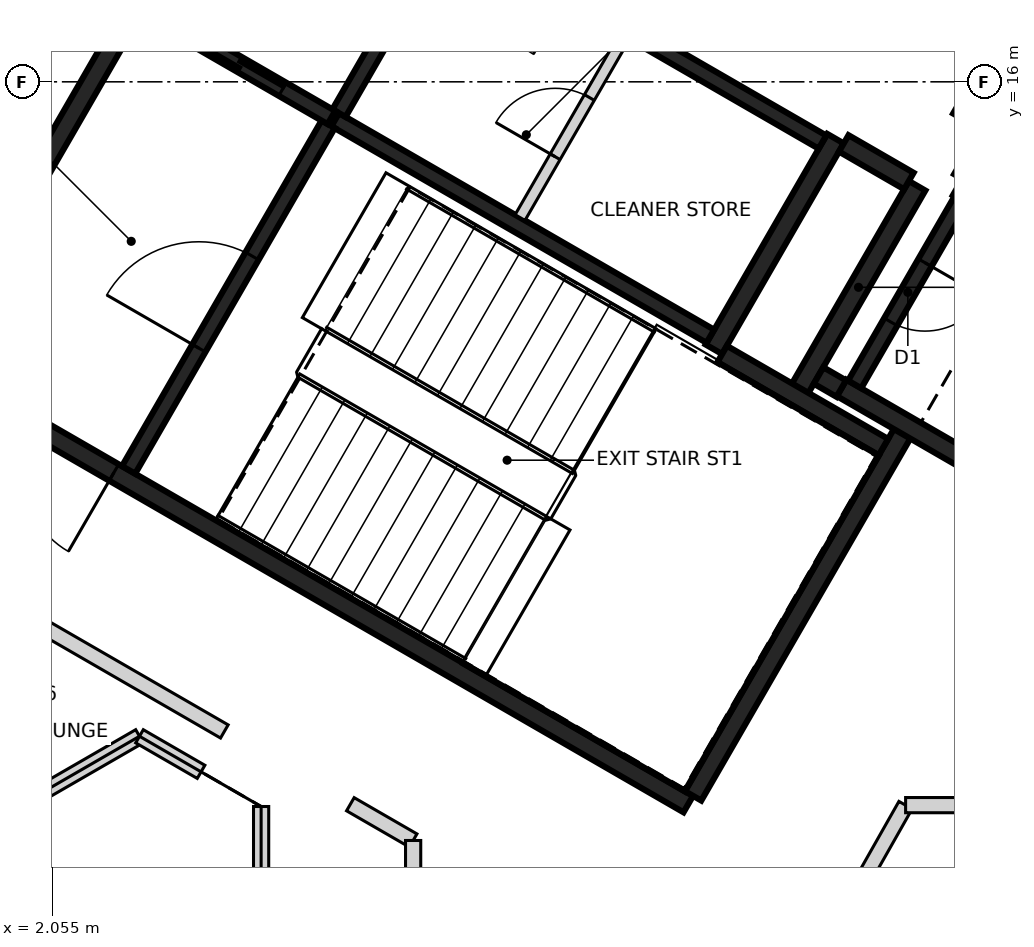
"""IFC4 building model, lengths in metres.
Left out: names, types, materials, properties, quantities, classifications, styles, units other than length and angle.
Written with IfcOpenShell. Run it as: python <this file> out.ifc"""

import sys

from ifc_helpers import new_model, si_unit, direction, frame, frame_2d, origin, place, context, subcontext, project, spatial, rectangle, extrude, element, fill, save


model = new_model("IFC4")
c1 = context("Model", 3, precision=1e-05, world=origin(), true_north=direction((0.0, 1.0)))
c2 = subcontext(c1, "Body", "Model", "MODEL_VIEW")
j1 = project(units=[si_unit("LENGTHUNIT", "METRE"), si_unit("PLANEANGLEUNIT", "RADIAN")], contexts=[c1])
p1 = place(None, origin())
s1 = spatial("IfcSite", under=j1, at=p1, CompositionType="ELEMENT")
p2 = place(p1, origin())
s2 = spatial("IfcBuilding", under=s1, at=p2, CompositionType="ELEMENT")
p3 = place(p2, frame((0.0, 0.0, 132.4)))
s3 = spatial("IfcBuildingStorey", under=s2, at=p3, CompositionType="ELEMENT", Elevation=132.4)
p4 = place(p3, frame((10.42, 6.498, 0.0), z_axis=(0.0, 0.0, 1.0), x_axis=(-0.866021906294, 0.500006057782, 0.0)))
e1 = element("IfcWall", 1, at=p4, inside=s3, PredefinedType="SHEAR", context=c2, shape_type="SweptSolid", body=[
    extrude(rectangle(XDim=11.55, YDim=0.25, at=frame_2d((5.775, 0.0))), origin(), (0.0, 0.0, 1.0), 3.2),
])
p5 = place(p4, frame((10.025, 0.0, 0.0)))
e2 = element("IfcOpeningElement", 2, at=p5, cuts=e1, PredefinedType="OPENING", context=c2, shape_type="SweptSolid", body=[
    extrude(rectangle(XDim=1.2, YDim=2.1, at=frame_2d((0.6, 1.05))), frame((0.0, 0.135, 0.0), z_axis=(0.0, -1.0, 0.0), x_axis=(1.0, 0.0, 0.0)), (0.0, 0.0, 1.0), 0.27),
])
p6 = place(p4, frame((8.725, 0.0, 0.0)))
e3 = element("IfcOpeningElement", 3, at=p6, cuts=e1, PredefinedType="OPENING", context=c2, shape_type="SweptSolid", body=[
    extrude(rectangle(XDim=1.2, YDim=2.1, at=frame_2d((0.6, 1.05))), frame((0.0, 0.135, 0.0), z_axis=(0.0, -1.0, 0.0), x_axis=(1.0, 0.0, 0.0)), (0.0, 0.0, 1.0), 0.27),
])
p7 = place(p3, frame((0.48, 12.381, 0.0), z_axis=(0.0, 0.0, 1.0), x_axis=(0.49999885962, 0.866026062182, 0.0)))
e4 = element("IfcWall", 4, at=p7, inside=s3, PredefinedType="SHEAR", context=c2, shape_type="SweptSolid", body=[
    extrude(rectangle(XDim=5.225, YDim=0.25, at=frame_2d((2.612, 0.0))), origin(), (0.0, 0.0, 1.0), 3.2),
])
p8 = place(p3, frame((13.238, 11.378, 0.0), z_axis=(0.0, 0.0, 1.0), x_axis=(-0.500008851346, -0.866020293397, 0.0)))
e5 = element("IfcWall", 5, at=p8, inside=s3, PredefinedType="SHEAR", context=c2, shape_type="SweptSolid", body=[
    extrude(rectangle(XDim=5.51, YDim=0.25, at=frame_2d((2.755, 0.0))), origin(), (0.0, 0.0, 1.0), 3.2),
])
p9 = place(p3, frame((12.357, 15.252, 0.0), z_axis=(0.0, 0.0, 1.0), x_axis=(-0.500028443584, -0.866008981251, 0.0)))
e6 = element("IfcWall", 6, at=p9, inside=s3, PredefinedType="SHEAR", context=c2, shape_type="SweptSolid", body=[
    extrude(rectangle(XDim=3.2, YDim=0.25, at=frame_2d((1.6, 0.0))), origin(), (0.0, 0.0, 1.0), 3.2),
])
p10 = place(p3, frame((14.918, 10.54, 0.0), z_axis=(0.0, 0.0, 1.0), x_axis=(-0.866063538972, 0.499933942099, 0.0)))
e7 = element("IfcWall", 7, at=p10, inside=s3, PredefinedType="SHEAR", context=c2, shape_type="SweptSolid", body=[
    extrude(rectangle(XDim=2.865, YDim=0.25, at=frame_2d((1.432, 0.0))), origin(), (0.0, 0.0, 1.0), 3.2),
])
p11 = place(p3, frame((13.963, 14.614, 0.0), z_axis=(0.0, 0.0, 1.0), x_axis=(0.866042235819, -0.499970844928, 0.0)))
e8 = element("IfcWall", 8, at=p11, inside=s3, PredefinedType="SHEAR", context=c2, shape_type="SweptSolid", body=[
    extrude(rectangle(XDim=2.865, YDim=0.25, at=frame_2d((1.432, 0.0))), origin(), (0.0, 0.0, 1.0), 3.2),
])
p12 = place(p3, frame((11.888, 11.961, 0.0), z_axis=(0.0, 0.0, 1.0), x_axis=(0.500003324108, 0.866023484601, 0.0)))
e9 = element("IfcWall", 9, at=p12, inside=s3, PredefinedType="SHEAR", context=c2, shape_type="SweptSolid", body=[
    extrude(rectangle(XDim=3.085, YDim=0.25, at=frame_2d((1.542, 0.0))), origin(), (0.0, 0.0, 1.0), 3.2),
])
p13 = place(p3, frame((10.865, 12.418, 0.0), z_axis=(0.0, 0.0, 1.0), x_axis=(0.866026229868, -0.499998569178, 0.0)))
e10 = element("IfcWall", 10, at=p13, inside=s3, PredefinedType="SHEAR", context=c2, shape_type="SweptSolid", body=[
    extrude(rectangle(XDim=2.449, YDim=0.25, at=frame_2d((1.225, 0.0))), origin(), (0.0, 0.0, 1.0), 3.2),
])
p14 = place(p3, frame((14.945, 17.135, 0.0), z_axis=(0.0, 0.0, 1.0), x_axis=(-0.499983108224, -0.866035156036, 0.0)))
e11 = element("IfcWall", 11, at=p14, inside=s3, PredefinedType="SHEAR", context=c2, shape_type="SweptSolid", body=[
    extrude(rectangle(XDim=1.865, YDim=0.25, at=frame_2d((0.932, 0.0))), origin(), (0.0, 0.0, 1.0), 3.2),
])
p15 = place(p14, frame((0.535, 0.0, 0.0)))
e12 = element("IfcOpeningElement", 12, at=p15, cuts=e11, PredefinedType="OPENING", context=c2, shape_type="SweptSolid", body=[
    extrude(rectangle(XDim=1.25, YDim=2.1, at=frame_2d((0.625, 1.05))), frame((0.0, 0.135, 0.0), z_axis=(0.0, -1.0, 0.0), x_axis=(1.0, 0.0, 0.0)), (0.0, 0.0, 1.0), 0.27),
])
p16 = place(p3, frame((13.322, 14.695, 0.0), z_axis=(0.0, 0.0, 1.0), x_axis=(-0.866017078145, 0.500014420154, 0.0)))
e13 = element("IfcWall", 13, at=p16, inside=s3, PredefinedType="SHEAR", context=c2, shape_type="SweptSolid", body=[
    extrude(rectangle(XDim=0.989, YDim=0.25, at=frame_2d((0.495, 0.0))), origin(), (0.0, 0.0, 1.0), 3.2),
])
p17 = place(p3, frame((14.368, 15.315, 0.0), z_axis=(0.0, 0.0, 1.0), x_axis=(-0.499897359611, -0.866084655132, 0.0)))
e14 = element("IfcWall", 14, at=p17, inside=s3, PredefinedType="SHEAR", context=c2, shape_type="SweptSolid", body=[
    extrude(rectangle(XDim=0.685, YDim=0.25, at=frame_2d((0.342, 0.0))), origin(), (0.0, 0.0, 1.0), 3.2),
])
p18 = place(p3, frame((12.433, 11.964, 0.0), z_axis=(0.0, 0.0, 1.0), x_axis=(-0.866055875208, 0.499947218231, 0.0)))
e15 = element("IfcWall", 15, at=p18, inside=s3, PredefinedType="SHEAR", context=c2, shape_type="SweptSolid", body=[
    extrude(rectangle(XDim=0.345, YDim=0.25, at=frame_2d((0.172, 0.0))), origin(), (0.0, 0.0, 1.0), 3.2),
])
p19 = place(p3, frame((5.775, 15.502, 0.0), z_axis=(0.0, 0.0, 1.0), x_axis=(0.866020080793, -0.500009219579, 0.0)))
e16 = element("IfcWall", 16, at=p19, inside=s3, PredefinedType="SHEAR", context=c2, shape_type="SweptSolid", body=[
    extrude(rectangle(XDim=5.699, YDim=0.2, at=frame_2d((2.85, 0.0))), origin(), (0.0, 0.0, 1.0), 3.2),
])
p20 = place(p3, frame((12.185, 15.207, 0.0), z_axis=(0.0, 0.0, 1.0), x_axis=(-0.866020080793, 0.500009219579, 0.0)))
e17 = element("IfcWall", 17, at=p20, inside=s3, PredefinedType="SHEAR", context=c2, shape_type="SweptSolid", body=[
    extrude(rectangle(XDim=5.699, YDim=0.2, at=frame_2d((2.85, 0.0))), origin(), (0.0, 0.0, 1.0), 3.2),
])
p21 = place(p20, frame((3.874, 0.0, 0.0)))
e18 = element("IfcOpeningElement", 18, at=p21, cuts=e17, PredefinedType="OPENING", context=c2, shape_type="SweptSolid", body=[
    extrude(rectangle(XDim=0.9, YDim=2.1, at=frame_2d((0.45, 1.05))), frame((0.0, 0.11, 0.0), z_axis=(0.0, -1.0, 0.0), x_axis=(1.0, 0.0, 0.0)), (0.0, 0.0, 1.0), 0.22),
])
p22 = place(p3, frame((3.057, 10.895, 0.0), z_axis=(0.0, 0.0, 1.0), x_axis=(0.499989418164, 0.866031513124, 0.0)))
e19 = element("IfcWall", 19, at=p22, inside=s3, PredefinedType="SHEAR", context=c2, shape_type="SweptSolid", body=[
    extrude(rectangle(XDim=5.251, YDim=0.2, at=frame_2d((2.625, 0.0))), origin(), (0.0, 0.0, 1.0), 3.2),
])
p23 = place(p22, frame((1.849, 0.0, 0.0)))
e20 = element("IfcOpeningElement", 20, at=p23, cuts=e19, PredefinedType="OPENING", context=c2, shape_type="SweptSolid", body=[
    extrude(rectangle(XDim=1.4, YDim=2.1, at=frame_2d((0.7, 1.05))), frame((0.0, 0.11, 0.0), z_axis=(0.0, -1.0, 0.0), x_axis=(1.0, 0.0, 0.0)), (0.0, 0.0, 1.0), 0.22),
])
p24 = place(p3, frame((14.008, 14.442, 0.0), z_axis=(0.0, 0.0, 1.0), x_axis=(-0.499986818241, -0.866033014143, 0.0)))
e21 = element("IfcWall", 21, at=p24, inside=s3, PredefinedType="SHEAR", context=c2, shape_type="SweptSolid", body=[
    extrude(rectangle(XDim=2.798, YDim=0.2, at=frame_2d((1.399, 0.0))), origin(), (0.0, 0.0, 1.0), 3.2),
])
p25 = place(p24, frame((0.949, 0.0, 0.0)))
e22 = element("IfcOpeningElement", 22, at=p25, cuts=e21, PredefinedType="OPENING", context=c2, shape_type="SweptSolid", body=[
    extrude(rectangle(XDim=0.9, YDim=2.1, at=frame_2d((0.45, 1.05))), frame((0.0, 0.11, 0.0), z_axis=(0.0, -1.0, 0.0), x_axis=(1.0, 0.0, 0.0)), (0.0, 0.0, 1.0), 0.22),
])
p26 = place(p3, frame((7.199, 17.97, 0.0), z_axis=(0.0, 0.0, 1.0), x_axis=(-0.499968400327, -0.866043647095, 0.0)))
e23 = element("IfcWall", 23, at=p26, inside=s3, PredefinedType="SHEAR", context=c2, shape_type="SweptSolid", body=[
    extrude(rectangle(XDim=2.75, YDim=0.2, at=frame_2d((1.375, 0.0))), origin(), (0.0, 0.0, 1.0), 3.2),
])
p27 = place(p3, frame((5.725, 15.531, 0.0), z_axis=(0.0, 0.0, 1.0), x_axis=(-0.866037306777, 0.499979382845, 0.0)))
e24 = element("IfcWall", 24, at=p27, inside=s3, PredefinedType="SHEAR", context=c2, shape_type="SweptSolid", body=[
    extrude(rectangle(XDim=2.742, YDim=0.2, at=frame_2d((1.371, 0.0))), origin(), (0.0, 0.0, 1.0), 3.2),
])
p28 = place(p27, frame((0.743, 0.0, 0.0)))
e25 = element("IfcOpeningElement", 25, at=p28, cuts=e24, PredefinedType="OPENING", context=c2, shape_type="SweptSolid", body=[
    extrude(rectangle(XDim=1.3, YDim=2.1, at=frame_2d((0.65, 1.05))), frame((0.0, 0.11, 0.0), z_axis=(0.0, -1.0, 0.0), x_axis=(1.0, 0.0, 0.0)), (0.0, 0.0, 1.0), 0.22),
])
p29 = place(p3, frame((8.207, 14.214, 0.0), z_axis=(0.0, 0.0, 1.0), x_axis=(0.499922376475, 0.866070215109, 0.0)))
e26 = element("IfcWall", 26, at=p29, inside=s3, PredefinedType="PARTITIONING", context=c2, shape_type="SweptSolid", body=[
    extrude(rectangle(XDim=2.749, YDim=0.15, at=frame_2d((1.374, 0.0))), origin(), (0.0, 0.0, 1.0), 3.2),
])
p30 = place(p29, frame((0.924, 0.0, 0.0)))
e27 = element("IfcOpeningElement", 27, at=p30, cuts=e26, PredefinedType="OPENING", context=c2, shape_type="SweptSolid", body=[
    extrude(rectangle(XDim=0.9, YDim=2.1, at=frame_2d((0.45, 1.05))), frame((0.0, 0.085, 0.0), z_axis=(0.0, -1.0, 0.0), x_axis=(1.0, 0.0, 0.0)), (0.0, 0.0, 1.0), 0.17),
])
p31 = place(p3, frame((1.813, 8.899, 0.0), z_axis=(0.0, 0.0, 1.0), x_axis=(0.865957732194, -0.50011719232, 0.0)))
e28 = element("IfcWall", 28, at=p31, inside=s3, PredefinedType="PARTITIONING", context=c2, shape_type="SweptSolid", body=[
    extrude(rectangle(XDim=2.891, YDim=0.2, at=frame_2d((1.445, 0.0))), origin(), (0.0, 0.0, 1.0), 2.3),
])
p32 = place(p3, frame((5.974, 6.496, 0.0), z_axis=(0.0, 0.0, 1.0), x_axis=(0.865934055563, -0.500158186394, 0.0)))
e29 = element("IfcWall", 29, at=p32, inside=s3, PredefinedType="PARTITIONING", context=c2, shape_type="SweptSolid", body=[
    extrude(rectangle(XDim=0.954, YDim=0.2, at=frame_2d((0.477, 0.0))), origin(), (0.0, 0.0, 1.0), 3.2),
])
p33 = place(p3, frame((6.8, -6.019, 0.0), z_axis=(0.0, 0.0, 1.0), x_axis=(0.0, 1.0, 0.0)))
e30 = element("IfcWall", 30, at=p33, inside=s3, PredefinedType="PARTITIONING", context=c2, shape_type="SweptSolid", body=[
    extrude(rectangle(XDim=12.038, YDim=0.2, at=frame_2d((6.019, 0.0))), origin(), (0.0, 0.0, 1.0), 3.2),
])
p34 = place(p33, frame((1.485, 0.0, 0.0)))
e31 = element("IfcOpeningElement", 31, at=p34, cuts=e30, PredefinedType="OPENING", context=c2, shape_type="SweptSolid", body=[
    extrude(rectangle(XDim=0.9, YDim=2.1, at=frame_2d((0.45, 1.05))), frame((0.0, 0.11, 0.0), z_axis=(0.0, -1.0, 0.0), x_axis=(1.0, 0.0, 0.0)), (0.0, 0.0, 1.0), 0.22),
])
p35 = place(p33, frame((7.492, 0.0, 0.0)))
e32 = element("IfcOpeningElement", 32, at=p35, cuts=e30, PredefinedType="OPENING", context=c2, shape_type="SweptSolid", body=[
    extrude(rectangle(XDim=0.9, YDim=2.1, at=frame_2d((0.45, 1.05))), frame((0.0, 0.11, 0.0), z_axis=(0.0, -1.0, 0.0), x_axis=(1.0, 0.0, 0.0)), (0.0, 0.0, 1.0), 0.22),
])
p36 = place(p3, frame((12.433, 4.992, 0.0), z_axis=(0.0, 0.0, 1.0), x_axis=(0.492807777065, 0.870138204462, 0.0)))
e33 = element("IfcWall", 33, at=p36, inside=s3, PredefinedType="PARTITIONING", context=c2, shape_type="SweptSolid", body=[
    extrude(rectangle(XDim=1.715, YDim=0.2, at=frame_2d((0.857, 0.0))), origin(), (0.0, 0.0, 1.0), 3.2),
])
p37 = place(p3, frame((13.279, 6.484, 0.0), z_axis=(0.0, 0.0, 1.0), x_axis=(1.0, 0.0, 0.0)))
e34 = element("IfcWall", 34, at=p37, inside=s3, PredefinedType="PARTITIONING", context=c2, shape_type="SweptSolid", body=[
    extrude(rectangle(XDim=2.943, YDim=0.2, at=frame_2d((1.471, 0.0))), origin(), (0.0, 0.0, 1.0), 3.2),
])
p38 = place(p37, frame((0.971, 0.0, 0.0)))
e35 = element("IfcOpeningElement", 35, at=p38, cuts=e34, PredefinedType="OPENING", context=c2, shape_type="SweptSolid", body=[
    extrude(rectangle(XDim=1.0, YDim=2.1, at=frame_2d((0.5, 1.05))), frame((0.0, 0.11, 0.0), z_axis=(0.0, -1.0, 0.0), x_axis=(1.0, 0.0, 0.0)), (0.0, 0.0, 1.0), 0.22),
])
p39 = place(p3, frame((-8.0, 0.924, 0.0), z_axis=(0.0, 0.0, 1.0), x_axis=(0.86604129137, 0.499972480886, 0.0)))
e36 = element("IfcWall", 36, at=p39, inside=s3, PredefinedType="PARTITIONING", context=c2, shape_type="SweptSolid", body=[
    extrude(rectangle(XDim=12.932, YDim=0.2, at=frame_2d((6.466, 0.0))), origin(), (0.0, 0.0, 1.0), 2.3),
])
p40 = place(p3, frame((3.2, 7.39, 0.0), z_axis=(0.0, 0.0, 1.0), x_axis=(0.865985641702, -0.500068863623, 0.0)))
e37 = element("IfcWall", 37, at=p40, inside=s3, PredefinedType="PARTITIONING", context=c2, shape_type="SweptSolid", body=[
    extrude(rectangle(XDim=0.935, YDim=0.2, at=frame_2d((0.468, 0.0))), origin(), (0.0, 0.0, 1.0), 2.3),
])
p41 = place(p3, frame((4.8, -6.466, 0.0), z_axis=(0.0, 0.0, 1.0), x_axis=(0.0, 1.0, 0.0)))
e38 = element("IfcWall", 38, at=p41, inside=s3, PredefinedType="PARTITIONING", context=c2, shape_type="SweptSolid", body=[
    extrude(rectangle(XDim=12.932, YDim=0.2, at=frame_2d((6.466, 0.0))), origin(), (0.0, 0.0, 1.0), 2.3),
])
p42 = place(p28, origin())
e39 = element("IfcDoor", 39, at=p42, inside=s3, OperationType="SLIDING_TO_RIGHT", PredefinedType="DOOR", context=c2, shape_type="SweptSolid", body=[
    extrude(rectangle(XDim=1.3, YDim=2.1, at=frame_2d((0.65, 1.05))), frame((0.0, 0.025, 0.0), z_axis=(0.0, -1.0, 0.0), x_axis=(1.0, 0.0, 0.0)), (0.0, 0.0, 1.0), 0.05),
])
fill(e25, e39)
p43 = place(p6, origin())
e40 = element("IfcDoor", 40, at=p43, inside=s3, OperationType="SINGLE_SWING_RIGHT", PredefinedType="DOOR", context=c2, shape_type="SweptSolid", body=[
    extrude(rectangle(XDim=1.2, YDim=2.1, at=frame_2d((0.6, 1.05))), frame((0.0, 0.025, 0.0), z_axis=(0.0, -1.0, 0.0), x_axis=(1.0, 0.0, 0.0)), (0.0, 0.0, 1.0), 0.05),
])
fill(e3, e40)
p44 = place(p23, origin())
e41 = element("IfcDoor", 41, at=p44, inside=s3, OperationType="SINGLE_SWING_RIGHT", PredefinedType="DOOR", context=c2, shape_type="SweptSolid", body=[
    extrude(rectangle(XDim=1.4, YDim=2.1, at=frame_2d((0.7, 1.05))), frame((0.0, 0.025, 0.0), z_axis=(0.0, -1.0, 0.0), x_axis=(1.0, 0.0, 0.0)), (0.0, 0.0, 1.0), 0.05),
])
fill(e20, e41)
p45 = place(p25, origin())
e42 = element("IfcDoor", 42, at=p45, inside=s3, OperationType="SINGLE_SWING_RIGHT", PredefinedType="DOOR", context=c2, shape_type="SweptSolid", body=[
    extrude(rectangle(XDim=0.9, YDim=2.1, at=frame_2d((0.45, 1.05))), frame((0.0, 0.025, 0.0), z_axis=(0.0, -1.0, 0.0), x_axis=(1.0, 0.0, 0.0)), (0.0, 0.0, 1.0), 0.05),
])
fill(e22, e42)
p46 = place(p30, origin())
e43 = element("IfcDoor", 43, at=p46, inside=s3, OperationType="SINGLE_SWING_LEFT", PredefinedType="DOOR", context=c2, shape_type="SweptSolid", body=[
    extrude(rectangle(XDim=0.9, YDim=2.1, at=frame_2d((0.45, 1.05))), frame((0.0, 0.025, 0.0), z_axis=(0.0, -1.0, 0.0), x_axis=(1.0, 0.0, 0.0)), (0.0, 0.0, 1.0), 0.05),
])
fill(e27, e43)
save(model, sys.argv[1])
